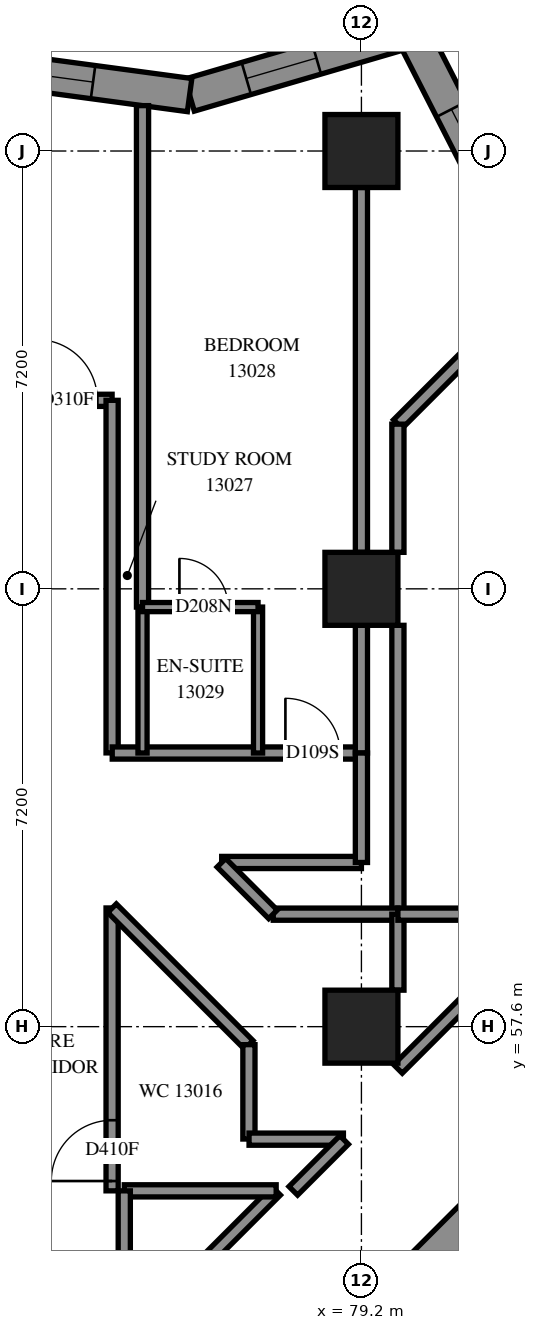
"""IFC4 building model, lengths in metres.
Left out: names, types, materials, properties, quantities, classifications, styles, units other than length and angle.
Written with IfcOpenShell. Run it as: python <this file> out.ifc"""

import sys

from ifc_helpers import new_model, si_unit, direction, frame, frame_2d, origin, origin_2d, place, context, subcontext, project, spatial, polyline, rectangle, outline, extrude, element, fill, save


model = new_model("IFC4")
c1 = context("Model", 3, precision=1e-05, world=origin(), true_north=direction((0.0, 1.0)))
c2 = subcontext(c1, "Body", "Model", "MODEL_VIEW")
j1 = project(units=[si_unit("LENGTHUNIT", "METRE"), si_unit("PLANEANGLEUNIT", "RADIAN")], contexts=[c1])
p1 = place(None, origin())
s1 = spatial("IfcSite", under=j1, at=p1, CompositionType="ELEMENT")
p2 = place(p1, origin())
s2 = spatial("IfcBuilding", under=s1, at=p2, CompositionType="ELEMENT")
p3 = place(p2, frame((0.0, 0.0, 50.8)))
s3 = spatial("IfcBuildingStorey", under=s2, at=p3, CompositionType="ELEMENT", Elevation=50.8)
for number, where, z_axis, x_axis in (
    (1, (79.2, 57.6, 0.0), (0.0, 0.0, 1.0), (1.0, 0.0, 0.0)),
    (2, (79.2, 64.8, 0.0), (0.0, 0.0, 1.0), (1.0, 0.0, 0.0)),
    (3, (79.2, 72.0, 0.0), (0.0, 0.0, 1.0), (1.0, 0.0, 0.0)),
):
    element("IfcColumn", number, at=place(p3, frame(where, z_axis=z_axis, x_axis=x_axis)), inside=s3, PredefinedType="COLUMN", context=c2, shape_type="SweptSolid", body=[
        extrude(rectangle(XDim=1.2, YDim=1.2, at=origin_2d()), origin(), (0.0, 0.0, 1.0), 3.1),
    ])
p4 = place(p3, frame((76.301, 49.443, -0.3), z_axis=(0.0, 0.0, 1.0), x_axis=(0.7071067812, 0.7071067812, 0.0)))
e4 = element("IfcWall", 4, at=p4, inside=s3, PredefinedType="SHEAR", context=c2, shape_type="SweptSolid", body=[
    extrude(rectangle(XDim=14.4, YDim=1.0, at=frame_2d((7.2, 0.0))), origin(), (0.0, 0.0, 1.0), 2.7),
])
p5 = place(p4, frame((4.55, 0.0, 0.3)))
e5 = element("IfcOpeningElement", 5, at=p5, cuts=e4, PredefinedType="OPENING", context=c2, shape_type="SweptSolid", body=[
    extrude(rectangle(XDim=1.1, YDim=2.1, at=frame_2d((0.55, 1.05))), frame((0.0, 0.51, 0.0), z_axis=(0.0, -1.0, 0.0), x_axis=(1.0, 0.0, 0.0)), (0.0, 0.0, 1.0), 1.02),
])
p6 = place(p4, frame((11.35, 0.0, 0.3)))
e6 = element("IfcOpeningElement", 6, at=p6, cuts=e4, PredefinedType="OPENING", context=c2, shape_type="SweptSolid", body=[
    extrude(rectangle(XDim=1.1, YDim=2.1, at=frame_2d((0.55, 1.05))), frame((0.0, 0.51, 0.0), z_axis=(0.0, -1.0, 0.0), x_axis=(1.0, 0.0, 0.0)), (0.0, 0.0, 1.0), 1.02),
])
p7 = place(p3, frame((81.585, 70.914, 0.0), z_axis=(0.0, 0.0, 1.0), x_axis=(-0.4549362519, 0.8905240068, 0.0)))
e7 = element("IfcWall", 7, at=p7, inside=s3, PredefinedType="SOLIDWALL", context=c2, shape_type="SweptSolid", body=[
    extrude(outline(polyline([(0.065, -0.275), (3.675, -0.275), (3.22, 0.275), (-0.065, 0.275), (0.065, -0.275)])), origin(), (0.0, 0.0, 1.0), 3.1),
])
p8 = place(p7, frame((0.79, 0.0, 0.5)))
e8 = element("IfcOpeningElement", 8, at=p8, cuts=e7, PredefinedType="OPENING", context=c2, shape_type="SweptSolid", body=[
    extrude(rectangle(XDim=1.2, YDim=2.45, at=frame_2d((0.6, 1.225))), frame((0.0, 0.285, 0.0), z_axis=(0.0, -1.0, 0.0), x_axis=(1.0, 0.0, 0.0)), (0.0, 0.0, 1.0), 0.57),
])
p9 = place(p3, frame((80.016, 73.984, 0.0), z_axis=(0.0, 0.0, 1.0), x_axis=(-0.9598383765, -0.280553544, 0.0)))
e9 = element("IfcWall", 9, at=p9, inside=s3, PredefinedType="SOLIDWALL", context=c2, shape_type="SweptSolid", body=[
    extrude(outline(polyline([(-0.228, -0.275), (3.736, -0.275), (3.853, 0.275), (0.228, 0.275), (-0.228, -0.275)])), origin(), (0.0, 0.0, 1.0), 3.1),
])
p10 = place(p9, frame((1.622, 0.0, 0.5)))
e10 = element("IfcOpeningElement", 10, at=p10, cuts=e9, PredefinedType="OPENING", context=c2, shape_type="SweptSolid", body=[
    extrude(rectangle(XDim=1.2, YDim=2.45, at=frame_2d((0.6, 1.225))), frame((0.0, 0.285, 0.0), z_axis=(0.0, -1.0, 0.0), x_axis=(1.0, 0.0, 0.0)), (0.0, 0.0, 1.0), 0.57),
])
p11 = place(p3, frame((76.374, 72.92, 0.0), z_axis=(0.0, 0.0, 1.0), x_axis=(-0.9910665233, 0.1333684607, 0.0)))
e11 = element("IfcWall", 11, at=p11, inside=s3, PredefinedType="SOLIDWALL", context=c2, shape_type="SweptSolid", body=[
    extrude(outline(polyline([(0.058, -0.275), (3.897, -0.275), (3.823, 0.275), (-0.058, 0.275), (0.058, -0.275)])), origin(), (0.0, 0.0, 1.0), 3.1),
])
p12 = place(p11, frame((1.602, 0.0, 0.5)))
e12 = element("IfcOpeningElement", 12, at=p12, cuts=e11, PredefinedType="OPENING", context=c2, shape_type="SweptSolid", body=[
    extrude(rectangle(XDim=1.2, YDim=2.45, at=frame_2d((0.6, 1.225))), frame((0.0, 0.285, 0.0), z_axis=(0.0, -1.0, 0.0), x_axis=(1.0, 0.0, 0.0)), (0.0, 0.0, 1.0), 0.57),
])
p13 = place(p3, frame((54.5, 67.9, 0.0), z_axis=(0.0, 0.0, 1.0), x_axis=(1.0, 0.0, 0.0)))
e13 = element("IfcWall", 13, at=p13, inside=s3, PredefinedType="PARTITIONING", context=c2, shape_type="SweptSolid", body=[
    extrude(rectangle(XDim=20.6, YDim=0.2, at=frame_2d((10.3, 0.0))), origin(), (0.0, 0.0, 1.0), 3.1),
])
p14 = place(p13, frame((0.198, 0.0, 0.0)))
e14 = element("IfcOpeningElement", 14, at=p14, cuts=e13, PredefinedType="OPENING", context=c2, shape_type="SweptSolid", body=[
    extrude(rectangle(XDim=1.0, YDim=2.1, at=frame_2d((0.5, 1.05))), frame((0.0, 0.11, 0.0), z_axis=(0.0, -1.0, 0.0), x_axis=(1.0, 0.0, 0.0)), (0.0, 0.0, 1.0), 0.22),
])
p15 = place(p13, frame((19.358, 0.0, 0.0)))
e15 = element("IfcOpeningElement", 15, at=p15, cuts=e13, PredefinedType="OPENING", context=c2, shape_type="SweptSolid", body=[
    extrude(rectangle(XDim=1.0, YDim=2.1, at=frame_2d((0.5, 1.05))), frame((0.0, 0.11, 0.0), z_axis=(0.0, -1.0, 0.0), x_axis=(1.0, 0.0, 0.0)), (0.0, 0.0, 1.0), 0.22),
])
p16 = place(p13, frame((6.698, 0.0, 0.0)))
e16 = element("IfcOpeningElement", 16, at=p16, cuts=e13, PredefinedType="OPENING", context=c2, shape_type="SweptSolid", body=[
    extrude(rectangle(XDim=0.9, YDim=2.1, at=frame_2d((0.45, 1.05))), frame((0.0, 0.11, 0.0), z_axis=(0.0, -1.0, 0.0), x_axis=(1.0, 0.0, 0.0)), (0.0, 0.0, 1.0), 0.22),
])
p17 = place(p13, frame((13.884, 0.0, 0.0)))
e17 = element("IfcOpeningElement", 17, at=p17, cuts=e13, PredefinedType="OPENING", context=c2, shape_type="SweptSolid", body=[
    extrude(rectangle(XDim=1.0, YDim=2.1, at=frame_2d((0.5, 1.05))), frame((0.0, 0.11, 0.0), z_axis=(0.0, -1.0, 0.0), x_axis=(1.0, 0.0, 0.0)), (0.0, 0.0, 1.0), 0.22),
])
p18 = place(p3, frame((75.6, 64.5, 0.0), z_axis=(0.0, 0.0, 1.0), x_axis=(0.0, 1.0, 0.0)))
e18 = element("IfcWall", 18, at=p18, inside=s3, PredefinedType="PARTITIONING", context=c2, shape_type="SweptSolid", body=[
    extrude(rectangle(XDim=8.246, YDim=0.2, at=frame_2d((4.123, 0.0))), origin(), (0.0, 0.0, 1.0), 3.1),
])
p19 = place(p3, frame((79.2, 65.4, 0.0), z_axis=(0.0, 0.0, 1.0), x_axis=(0.0, 1.0, 0.0)))
e19 = element("IfcWall", 19, at=p19, inside=s3, PredefinedType="PARTITIONING", context=c2, shape_type="SweptSolid", body=[
    extrude(rectangle(XDim=6.0, YDim=0.2, at=frame_2d((3.0, 0.0))), origin(), (0.0, 0.0, 1.0), 3.1),
])
p20 = place(p3, frame((75.1, 62.102, 0.0), z_axis=(0.0, 0.0, 1.0), x_axis=(0.0, 1.0, 0.0)))
e20 = element("IfcWall", 20, at=p20, inside=s3, PredefinedType="PARTITIONING", context=c2, shape_type="SweptSolid", body=[
    extrude(rectangle(XDim=5.798, YDim=0.2, at=frame_2d((2.899, 0.0))), origin(), (0.0, 0.0, 1.0), 3.1),
])
p21 = place(p3, frame((79.8, 59.45, 0.0), z_axis=(0.0, 0.0, 1.0), x_axis=(0.0, 1.0, 0.0)))
e21 = element("IfcWall", 21, at=p21, inside=s3, PredefinedType="PARTITIONING", context=c2, shape_type="SweptSolid", body=[
    extrude(rectangle(XDim=4.75, YDim=0.2, at=frame_2d((2.375, 0.0))), origin(), (0.0, 0.0, 1.0), 3.1),
])
p22 = place(p3, frame((75.1, 54.9, 0.0), z_axis=(0.0, 0.0, 1.0), x_axis=(0.0, 1.0, 0.0)))
e22 = element("IfcWall", 22, at=p22, inside=s3, PredefinedType="PARTITIONING", context=c2, shape_type="SweptSolid", body=[
    extrude(rectangle(XDim=4.652, YDim=0.2, at=frame_2d((2.326, 0.0))), origin(), (0.0, 0.0, 1.0), 3.1),
])
p23 = place(p22, frame((0.161, 0.0, 0.0)))
e23 = element("IfcOpeningElement", 23, at=p23, cuts=e22, PredefinedType="OPENING", context=c2, shape_type="SweptSolid", body=[
    extrude(rectangle(XDim=1.0, YDim=2.1, at=frame_2d((0.5, 1.05))), frame((0.0, 0.11, 0.0), z_axis=(0.0, -1.0, 0.0), x_axis=(1.0, 0.0, 0.0)), (0.0, 0.0, 1.0), 0.22),
])
p24 = place(p3, frame((75.102, 62.1, 0.0), z_axis=(0.0, 0.0, 1.0), x_axis=(1.0, 0.0, 0.0)))
e24 = element("IfcWall", 24, at=p24, inside=s3, PredefinedType="PARTITIONING", context=c2, shape_type="SweptSolid", body=[
    extrude(rectangle(XDim=4.098, YDim=0.2, at=frame_2d((2.049, 0.0))), origin(), (0.0, 0.0, 1.0), 3.1),
])
p25 = place(p24, frame((2.848, 0.0, 0.0)))
e25 = element("IfcOpeningElement", 25, at=p25, cuts=e24, PredefinedType="OPENING", context=c2, shape_type="SweptSolid", body=[
    extrude(rectangle(XDim=0.9, YDim=2.1, at=frame_2d((0.45, 1.05))), frame((0.0, 0.11, 0.0), z_axis=(0.0, -1.0, 0.0), x_axis=(1.0, 0.0, 0.0)), (0.0, 0.0, 1.0), 0.22),
])
p26 = place(p3, frame((79.799, 67.509, 0.0), z_axis=(0.0, 0.0, 1.0), x_axis=(0.7070927486, 0.7071208134, 0.0)))
e26 = element("IfcWall", 26, at=p26, inside=s3, PredefinedType="PARTITIONING", context=c2, shape_type="SweptSolid", body=[
    extrude(rectangle(XDim=3.563, YDim=0.2, at=frame_2d((1.782, 0.0))), origin(), (0.0, 0.0, 1.0), 3.1),
])
p27 = place(p3, frame((75.099, 59.549, 0.0), z_axis=(0.0, 0.0, 1.0), x_axis=(0.7071067812, -0.7071067812, 0.0)))
e27 = element("IfcWall", 27, at=p27, inside=s3, PredefinedType="PARTITIONING", context=c2, shape_type="SweptSolid", body=[
    extrude(rectangle(XDim=3.179, YDim=0.2, at=frame_2d((1.59, 0.0))), origin(), (0.0, 0.0, 1.0), 3.1),
])
p28 = place(p3, frame((75.997, 53.101, 0.0), z_axis=(0.0, 0.0, 1.0), x_axis=(0.7071067812, 0.7071067812, 0.0)))
e28 = element("IfcWall", 28, at=p28, inside=s3, PredefinedType="PARTITIONING", context=c2, shape_type="SweptSolid", body=[
    extrude(rectangle(XDim=2.546, YDim=0.2, at=frame_2d((1.273, 0.0))), origin(), (0.0, 0.0, 1.0), 3.1),
])
p29 = place(p3, frame((75.3, 54.9, 0.0), z_axis=(0.0, 0.0, 1.0), x_axis=(1.0, 0.0, 0.0)))
e29 = element("IfcWall", 29, at=p29, inside=s3, PredefinedType="PARTITIONING", context=c2, shape_type="SweptSolid", body=[
    extrude(rectangle(XDim=2.498, YDim=0.2, at=frame_2d((1.249, 0.0))), origin(), (0.0, 0.0, 1.0), 3.1),
])
for number, where, z_axis, x_axis in (
    (30, (75.6, 62.1, 0.0), (0.0, 0.0, 1.0), (0.0, 1.0, 0.0)),
    (31, (77.5, 62.1, 0.0), (0.0, 0.0, 1.0), (0.0, 1.0, 0.0)),
):
    element("IfcWall", number, at=place(p3, frame(where, z_axis=z_axis, x_axis=x_axis)), inside=s3, PredefinedType="PARTITIONING", context=c2, shape_type="SweptSolid", body=[
        extrude(rectangle(XDim=2.4, YDim=0.15, at=frame_2d((1.2, 0.0))), origin(), (0.0, 0.0, 1.0), 3.1),
    ])
p30 = place(p3, frame((76.902, 60.3, 0.0), z_axis=(0.0, 0.0, 1.0), x_axis=(1.0, 0.0, 0.0)))
e32 = element("IfcWall", 32, at=p30, inside=s3, PredefinedType="PARTITIONING", context=c2, shape_type="SweptSolid", body=[
    extrude(rectangle(XDim=2.298, YDim=0.2, at=frame_2d((1.149, 0.0))), origin(), (0.0, 0.0, 1.0), 3.1),
])
p31 = place(p3, frame((79.8, 65.4, 0.0), z_axis=(0.0, 0.0, 1.0), x_axis=(0.0, 1.0, 0.0)))
e33 = element("IfcWall", 33, at=p31, inside=s3, PredefinedType="PARTITIONING", context=c2, shape_type="SweptSolid", body=[
    extrude(rectangle(XDim=2.108, YDim=0.2, at=frame_2d((1.054, 0.0))), origin(), (0.0, 0.0, 1.0), 3.1),
])
p32 = place(p3, frame((79.2, 62.1, 0.0), z_axis=(0.0, 0.0, 1.0), x_axis=(0.0, 1.0, 0.0)))
e34 = element("IfcWall", 34, at=p32, inside=s3, PredefinedType="PARTITIONING", context=c2, shape_type="SweptSolid", body=[
    extrude(rectangle(XDim=2.1, YDim=0.2, at=frame_2d((1.05, 0.0))), origin(), (0.0, 0.0, 1.0), 3.1),
])
p33 = place(p3, frame((77.75, 59.45, 0.0), z_axis=(0.0, 0.0, 1.0), x_axis=(1.0, 0.0, 0.0)))
e35 = element("IfcWall", 35, at=p33, inside=s3, PredefinedType="PARTITIONING", context=c2, shape_type="SweptSolid", body=[
    extrude(rectangle(XDim=2.05, YDim=0.2, at=frame_2d((1.025, 0.0))), origin(), (0.0, 0.0, 1.0), 3.1),
])
p34 = place(p3, frame((75.6, 64.5, 0.0), z_axis=(0.0, 0.0, 1.0), x_axis=(1.0, 0.0, 0.0)))
e36 = element("IfcWall", 36, at=p34, inside=s3, PredefinedType="PARTITIONING", context=c2, shape_type="SweptSolid", body=[
    extrude(rectangle(XDim=1.9, YDim=0.15, at=frame_2d((0.95, 0.0))), origin(), (0.0, 0.0, 1.0), 3.1),
])
p35 = place(p34, frame((0.607, 0.0, 0.0)))
e37 = element("IfcOpeningElement", 37, at=p35, cuts=e36, PredefinedType="OPENING", context=c2, shape_type="SweptSolid", body=[
    extrude(rectangle(XDim=0.8, YDim=2.1, at=frame_2d((0.4, 1.05))), frame((0.0, 0.085, 0.0), z_axis=(0.0, -1.0, 0.0), x_axis=(1.0, 0.0, 0.0)), (0.0, 0.0, 1.0), 0.17),
])
for number, where, z_axis, x_axis in (
    (38, (79.2, 60.3, 0.0), (0.0, 0.0, 1.0), (0.0, 1.0, 0.0)),
    (39, (75.3, 53.1, 0.0), (0.0, 0.0, 1.0), (0.0, 1.0, 0.0)),
):
    element("IfcWall", number, at=place(p3, frame(where, z_axis=z_axis, x_axis=x_axis)), inside=s3, PredefinedType="PARTITIONING", context=c2, shape_type="SweptSolid", body=[
        extrude(rectangle(XDim=1.8, YDim=0.2, at=frame_2d((0.9, 0.0))), origin(), (0.0, 0.0, 1.0), 3.1),
    ])
p36 = place(p3, frame((79.801, 56.905, 0.0), z_axis=(0.0, 0.0, 1.0), x_axis=(0.7071067812, 0.7071067812, 0.0)))
e40 = element("IfcWall", 40, at=p36, inside=s3, PredefinedType="PARTITIONING", context=c2, shape_type="SweptSolid", body=[
    extrude(rectangle(XDim=1.765, YDim=0.2, at=frame_2d((0.882, 0.0))), origin(), (0.0, 0.0, 1.0), 3.1),
])
for number, where, z_axis, x_axis in (
    (41, (77.35, 55.752, 0.0), (0.0, 0.0, 1.0), (0.0, 1.0, 0.0)),
    (42, (77.352, 55.75, 0.0), (0.0, 0.0, 1.0), (1.0, 0.0, 0.0)),
):
    element("IfcWall", number, at=place(p3, frame(where, z_axis=z_axis, x_axis=x_axis)), inside=s3, PredefinedType="PARTITIONING", context=c2, shape_type="SweptSolid", body=[
        extrude(rectangle(XDim=1.552, YDim=0.2, at=frame_2d((0.776, 0.0))), origin(), (0.0, 0.0, 1.0), 3.1),
    ])
p37 = place(p3, frame((79.8, 58.2, 0.0), z_axis=(0.0, 0.0, 1.0), x_axis=(0.0, 1.0, 0.0)))
e43 = element("IfcWall", 43, at=p37, inside=s3, PredefinedType="PARTITIONING", context=c2, shape_type="SweptSolid", body=[
    extrude(rectangle(XDim=1.25, YDim=0.2, at=frame_2d((0.625, 0.0))), origin(), (0.0, 0.0, 1.0), 3.1),
])
p38 = place(p3, frame((79.8, 59.45, 0.0), z_axis=(0.0, 0.0, 1.0), x_axis=(1.0, 0.0, 0.0)))
e44 = element("IfcWall", 44, at=p38, inside=s3, PredefinedType="PARTITIONING", context=c2, shape_type="SweptSolid", body=[
    extrude(rectangle(XDim=1.248, YDim=0.2, at=frame_2d((0.624, 0.0))), origin(), (0.0, 0.0, 1.0), 3.1),
])
p39 = place(p3, frame((76.897, 60.295, 0.0), z_axis=(0.0, 0.0, 1.0), x_axis=(0.7071067812, -0.7071067812, 0.0)))
e45 = element("IfcWall", 45, at=p39, inside=s3, PredefinedType="PARTITIONING", context=c2, shape_type="SweptSolid", body=[
    extrude(rectangle(XDim=1.199, YDim=0.2, at=frame_2d((0.6, 0.0))), origin(), (0.0, 0.0, 1.0), 3.1),
])
p40 = place(p3, frame((78.079, 54.901, 0.0), z_axis=(0.0, 0.0, 1.0), x_axis=(0.7071067812, 0.7071067812, 0.0)))
e46 = element("IfcWall", 46, at=p40, inside=s3, PredefinedType="PARTITIONING", context=c2, shape_type="SweptSolid", body=[
    extrude(rectangle(XDim=1.182, YDim=0.2, at=frame_2d((0.591, 0.0))), origin(), (0.0, 0.0, 1.0), 3.1),
])
p41 = place(p8, origin())
e47 = element("IfcWindow", 47, at=p41, inside=s3, PartitioningType="SINGLE_PANEL", PredefinedType="WINDOW", context=c2, shape_type="SweptSolid", body=[
    extrude(rectangle(XDim=1.2, YDim=2.45, at=frame_2d((0.6, 1.225))), frame((0.0, 0.155, 0.0), z_axis=(0.0, -1.0, 0.0), x_axis=(1.0, 0.0, 0.0)), (0.0, 0.0, 1.0), 0.06),
])
fill(e8, e47)
p42 = place(p10, origin())
e48 = element("IfcWindow", 48, at=p42, inside=s3, PartitioningType="SINGLE_PANEL", PredefinedType="WINDOW", context=c2, shape_type="SweptSolid", body=[
    extrude(rectangle(XDim=1.2, YDim=2.45, at=frame_2d((0.6, 1.225))), frame((0.0, 0.155, 0.0), z_axis=(0.0, -1.0, 0.0), x_axis=(1.0, 0.0, 0.0)), (0.0, 0.0, 1.0), 0.06),
])
fill(e10, e48)
p43 = place(p12, origin())
e49 = element("IfcWindow", 49, at=p43, inside=s3, PartitioningType="SINGLE_PANEL", PredefinedType="WINDOW", context=c2, shape_type="SweptSolid", body=[
    extrude(rectangle(XDim=1.2, YDim=2.45, at=frame_2d((0.6, 1.225))), frame((0.0, 0.155, 0.0), z_axis=(0.0, -1.0, 0.0), x_axis=(1.0, 0.0, 0.0)), (0.0, 0.0, 1.0), 0.06),
])
fill(e12, e49)
p44 = place(p23, origin())
e50 = element("IfcDoor", 50, at=p44, inside=s3, OperationType="SINGLE_SWING_LEFT", PredefinedType="DOOR", context=c2, shape_type="SweptSolid", body=[
    extrude(rectangle(XDim=1.0, YDim=2.1, at=frame_2d((0.5, 1.05))), frame((0.0, 0.025, 0.0), z_axis=(0.0, -1.0, 0.0), x_axis=(1.0, 0.0, 0.0)), (0.0, 0.0, 1.0), 0.05),
])
fill(e23, e50)
p45 = place(p15, origin())
e51 = element("IfcDoor", 51, at=p45, inside=s3, OperationType="SINGLE_SWING_RIGHT", PredefinedType="DOOR", context=c2, shape_type="SweptSolid", body=[
    extrude(rectangle(XDim=1.0, YDim=2.1, at=frame_2d((0.5, 1.05))), frame((0.0, 0.025, 0.0), z_axis=(0.0, -1.0, 0.0), x_axis=(1.0, 0.0, 0.0)), (0.0, 0.0, 1.0), 0.05),
])
fill(e15, e51)
p46 = place(p25, origin())
e52 = element("IfcDoor", 52, at=p46, inside=s3, OperationType="SINGLE_SWING_LEFT", PredefinedType="DOOR", context=c2, shape_type="SweptSolid", body=[
    extrude(rectangle(XDim=0.9, YDim=2.1, at=frame_2d((0.45, 1.05))), frame((0.0, 0.025, 0.0), z_axis=(0.0, -1.0, 0.0), x_axis=(1.0, 0.0, 0.0)), (0.0, 0.0, 1.0), 0.05),
])
fill(e25, e52)
p47 = place(p35, origin())
e53 = element("IfcDoor", 53, at=p47, inside=s3, OperationType="SINGLE_SWING_RIGHT", PredefinedType="DOOR", context=c2, shape_type="SweptSolid", body=[
    extrude(rectangle(XDim=0.8, YDim=2.1, at=frame_2d((0.4, 1.05))), frame((0.0, 0.025, 0.0), z_axis=(0.0, -1.0, 0.0), x_axis=(1.0, 0.0, 0.0)), (0.0, 0.0, 1.0), 0.05),
])
fill(e37, e53)
save(model, sys.argv[1])
